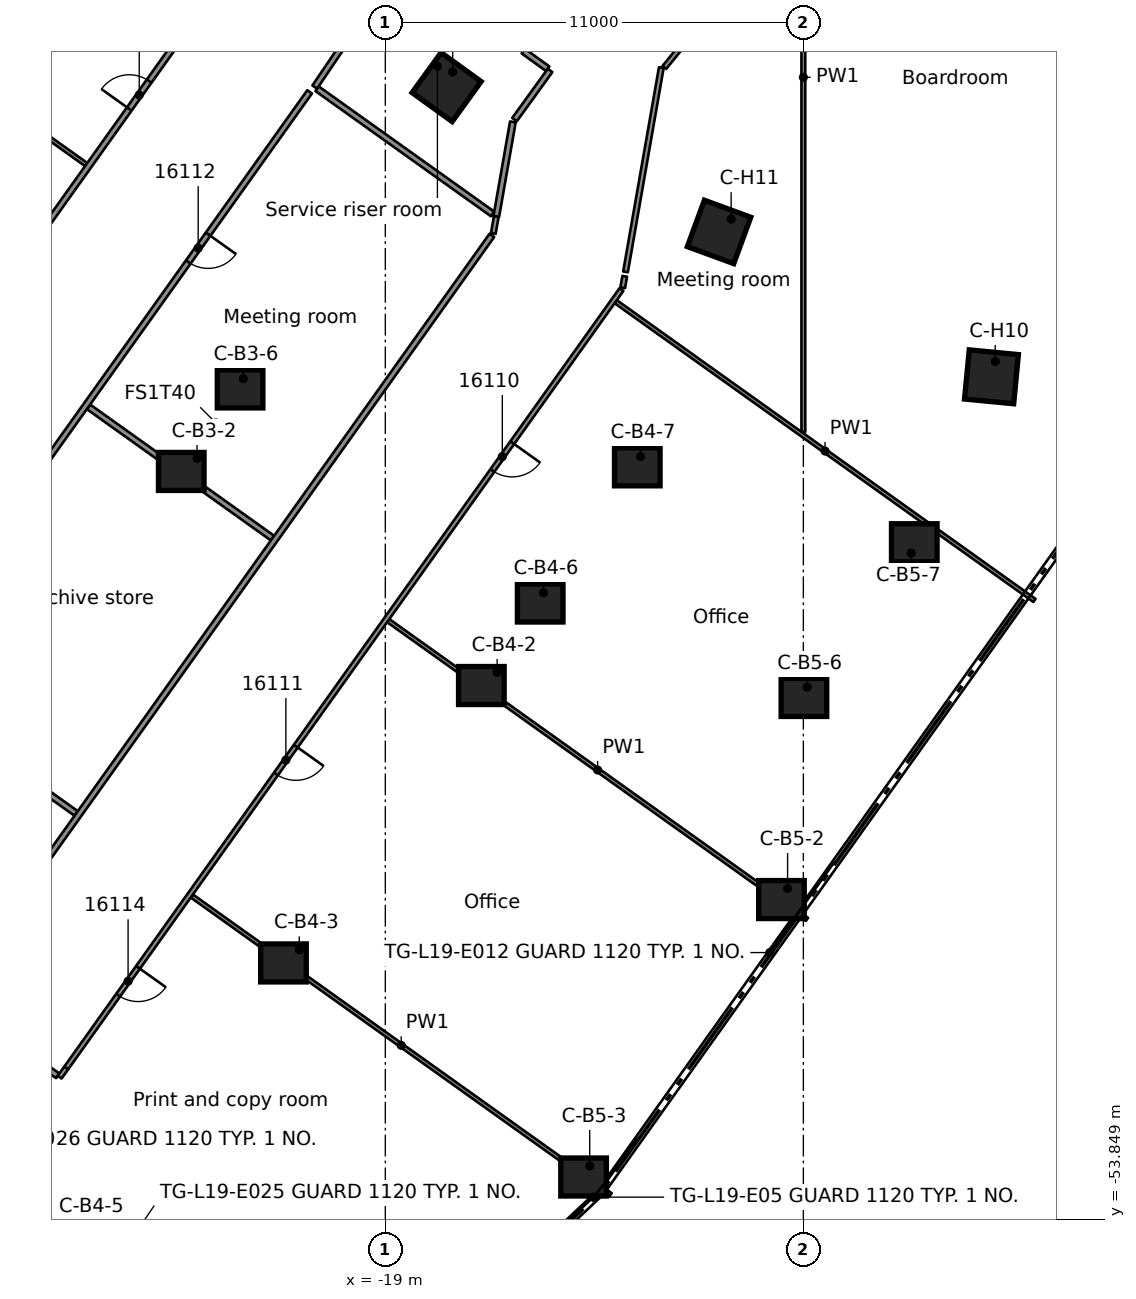
"""IFC4 building model, lengths in metres.
Left out: names, types, materials, properties, quantities, classifications, styles, units other than length and angle.
Written with IfcOpenShell. Run it as: python <this file> out.ifc"""

import sys

from ifc_helpers import new_model, si_unit, direction, frame, frame_2d, origin, origin_2d, place, context, subcontext, project, spatial, rectangle, extrude, element, fill, save


model = new_model("IFC4")
c1 = context("Model", 3, precision=1e-05, world=origin(), true_north=direction((0.0, 1.0)))
c2 = subcontext(c1, "Body", "Model", "MODEL_VIEW")
j1 = project(units=[si_unit("LENGTHUNIT", "METRE"), si_unit("PLANEANGLEUNIT", "RADIAN")], contexts=[c1])
p1 = place(None, origin())
s1 = spatial("IfcSite", under=j1, at=p1, CompositionType="ELEMENT")
p2 = place(p1, origin())
s2 = spatial("IfcBuilding", under=s1, at=p2, CompositionType="ELEMENT")
p3 = place(p2, frame((0.0, 0.0, 80.7)))
s3 = spatial("IfcBuildingStorey", under=s2, at=p3, CompositionType="ELEMENT", Elevation=80.7)
for number, where, z_axis, x_axis in (
    (1, (-24.37, -34.166, 0.0), (0.0, 0.0, 1.0), (1.0, 0.0, 0.0)),
    (2, (-22.822, -31.995, 0.0), (0.0, 0.0, 1.0), (1.0, 0.0, 0.0)),
    (3, (-16.473, -39.799, 0.0), (0.0, 0.0, 1.0), (1.0, 0.0, 0.0)),
    (4, (-21.68, -47.098, 0.0), (0.0, 0.0, 1.0), (1.0, 0.0, 0.0)),
    (5, (-14.925, -37.628, 0.0), (0.0, 0.0, 1.0), (1.0, 0.0, 0.0)),
    (6, (-12.37, -34.045, 0.0), (0.0, 0.0, 1.0), (1.0, 0.0, 0.0)),
    (7, (-8.576, -45.431, 0.0), (0.0, 0.0, 1.0), (1.0, 0.0, 0.0)),
    (8, (-13.783, -52.731, 0.0), (0.0, 0.0, 1.0), (1.0, 0.0, 0.0)),
    (9, (-7.985, -40.113, 0.0), (0.0, 0.0, 1.0), (1.0, 0.0, 0.0)),
    (10, (-5.081, -36.042, 0.0), (0.0, 0.0, 1.0), (1.0, 0.0, 0.0)),
):
    element("IfcColumn", number, at=place(p3, frame(where, z_axis=z_axis, x_axis=x_axis)), inside=s3, PredefinedType="COLUMN", context=c2, shape_type="SweptSolid", body=[
        extrude(rectangle(XDim=1.2, YDim=1.0, at=origin_2d()), origin(), (0.0, 0.0, 1.0), 3.5),
    ])
for number, where, z_axis, x_axis in (
    (11, (-3.05, -31.676, 0.0), (0.0, 0.0, 1.0), (-0.096, -0.995, 0.0)),
    (12, (-10.218, -27.864, 0.0), (0.0, 0.0, 1.0), (-0.344, -0.939, 0.0)),
    (13, (-17.387, -24.053, 0.0), (0.0, 0.0, 1.0), (-0.586, -0.81, 0.0)),
):
    element("IfcColumn", number, at=place(p3, frame(where, z_axis=z_axis, x_axis=x_axis)), inside=s3, PredefinedType="COLUMN", context=c2, shape_type="SweptSolid", body=[
        extrude(rectangle(XDim=1.3, YDim=1.3, at=origin_2d()), origin(), (0.0, 0.0, 1.0), 3.5),
    ])
p4 = place(p3, frame((-15.369, -23.107, 0.0), z_axis=(0.0, 0.0, 1.0), x_axis=(0.810768536176, -0.585366877049, 0.0)))
e14 = element("IfcWall", 14, at=p4, inside=s3, PredefinedType="PARTITIONING", context=c2, shape_type="SweptSolid", body=[
    extrude(rectangle(XDim=0.793, YDim=0.15, at=frame_2d((0.396, 0.0))), origin(), (0.0, 0.0, 1.0), 3.08),
])
p5 = place(p3, frame((-27.621, -50.068, 0.0), z_axis=(0.0, 0.0, 1.0), x_axis=(-0.814096747286, 0.580729270881, 0.0)))
e15 = element("IfcWall", 15, at=p5, inside=s3, PredefinedType="PARTITIONING", context=c2, shape_type="SweptSolid", body=[
    extrude(rectangle(XDim=13.163, YDim=0.15, at=frame_2d((6.582, 0.0))), origin(), (0.0, 0.0, 1.0), 3.08),
])
p6 = place(p5, frame((9.438, 0.0, 0.0)))
e16 = element("IfcOpeningElement", 16, at=p6, cuts=e15, PredefinedType="OPENING", context=c2, shape_type="SweptSolid", body=[
    extrude(rectangle(XDim=0.9, YDim=2.1, at=frame_2d((0.45, 1.05))), frame((0.0, 0.085, 0.0), z_axis=(0.0, -1.0, 0.0), x_axis=(1.0, 0.0, 0.0)), (0.0, 0.0, 1.0), 0.17),
])
p7 = place(p3, frame((-31.979, -39.712, 0.0), z_axis=(0.0, 0.0, 1.0), x_axis=(0.814224065699, -0.580550747857, 0.0)))
e17 = element("IfcWall", 17, at=p7, inside=s3, PredefinedType="PARTITIONING", context=c2, shape_type="SweptSolid", body=[
    extrude(rectangle(XDim=5.948, YDim=0.15, at=frame_2d((2.974, 0.0))), origin(), (0.0, 0.0, 1.0), 3.08),
])
p8 = place(p3, frame((-24.092, -45.337, 0.0), z_axis=(0.0, 0.0, 1.0), x_axis=(0.81412935301, -0.580683559753, 0.0)))
e18 = element("IfcWall", 18, at=p8, inside=s3, PredefinedType="PARTITIONING", context=c2, shape_type="SweptSolid", body=[
    extrude(rectangle(XDim=13.536, YDim=0.1, at=frame_2d((6.768, 0.0))), origin(), (0.0, 0.0, 1.0), 3.08),
])
p9 = place(p3, frame((-26.811, -32.466, 0.0), z_axis=(0.0, 0.0, 1.0), x_axis=(0.814165859022, -0.580632374229, 0.0)))
e19 = element("IfcWall", 19, at=p9, inside=s3, PredefinedType="PARTITIONING", context=c2, shape_type="SweptSolid", body=[
    extrude(rectangle(XDim=5.948, YDim=0.15, at=frame_2d((2.974, 0.0))), origin(), (0.0, 0.0, 1.0), 3.08),
])
p10 = place(p3, frame((-18.924, -38.091, 0.0), z_axis=(0.0, 0.0, 1.0), x_axis=(0.814103772743, -0.580719422101, 0.0)))
e20 = element("IfcWall", 20, at=p10, inside=s3, PredefinedType="PARTITIONING", context=c2, shape_type="SweptSolid", body=[
    extrude(rectangle(XDim=13.536, YDim=0.1, at=frame_2d((6.768, 0.0))), origin(), (0.0, 0.0, 1.0), 3.08),
])
p11 = place(p3, frame((-37.883, -18.239, 0.0), z_axis=(0.0, 0.0, 1.0), x_axis=(0.814185756817, -0.580604472423, 0.0)))
e21 = element("IfcWall", 21, at=p11, inside=s3, PredefinedType="PARTITIONING", context=c2, shape_type="SweptSolid", body=[
    extrude(rectangle(XDim=13.524, YDim=0.1, at=frame_2d((6.762, 0.0))), origin(), (0.0, 0.0, 1.0), 3.08),
])
p12 = place(p3, frame((-20.796, -24.096, 0.0), z_axis=(0.0, 0.0, 1.0), x_axis=(0.814114264503, -0.580704713544, 0.0)))
e22 = element("IfcWall", 22, at=p12, inside=s3, PredefinedType="PARTITIONING", context=c2, shape_type="SweptSolid", body=[
    extrude(rectangle(XDim=5.672, YDim=0.15, at=frame_2d((2.836, 0.0))), origin(), (0.0, 0.0, 1.0), 3.08),
])
p13 = place(p3, frame((-12.939, -29.699, 0.0), z_axis=(0.0, 0.0, 1.0), x_axis=(0.814095245994, -0.580731375465, 0.0)))
e23 = element("IfcWall", 23, at=p13, inside=s3, PredefinedType="PARTITIONING", context=c2, shape_type="SweptSolid", body=[
    extrude(rectangle(XDim=13.537, YDim=0.1, at=frame_2d((6.768, 0.0))), origin(), (0.0, 0.0, 1.0), 3.08),
])
p14 = place(p3, frame((-11.659, -23.538, 0.0), z_axis=(0.0, 0.0, 1.0), x_axis=(0.629190636354, 0.777251016805, 0.0)))
e24 = element("IfcWall", 24, at=p14, inside=s3, PredefinedType="PARTITIONING", context=c2, shape_type="SweptSolid", body=[
    extrude(rectangle(XDim=0.925, YDim=0.125, at=frame_2d((0.462, 0.0))), origin(), (0.0, 0.0, 1.0), 3.08),
])
p15 = place(p3, frame((-20.857, -24.052, 0.0), z_axis=(0.0, 0.0, 1.0), x_axis=(0.560544895906, 0.828124036406, 0.0)))
e25 = element("IfcWall", 25, at=p15, inside=s3, PredefinedType="PARTITIONING", context=c2, shape_type="SweptSolid", body=[
    extrude(rectangle(XDim=3.472, YDim=0.15, at=frame_2d((1.736, 0.0))), origin(), (0.0, 0.0, 1.0), 3.08),
])
p16 = place(p3, frame((-15.6, -24.908, 0.0), z_axis=(0.0, 0.0, 1.0), x_axis=(0.586004379832, 0.810307883966, 0.0)))
e26 = element("IfcWall", 26, at=p16, inside=s3, PredefinedType="PARTITIONING", context=c2, shape_type="SweptSolid", body=[
    extrude(rectangle(XDim=1.596, YDim=0.15, at=frame_2d((0.798, 0.0))), origin(), (0.0, 0.0, 1.0), 3.08),
])
p17 = place(p3, frame((-27.57, -50.104, 0.0), z_axis=(0.0, 0.0, 1.0), x_axis=(0.583082940186, 0.812412632142, 0.0)))
e27 = element("IfcWall", 27, at=p17, inside=s3, PredefinedType="PARTITIONING", context=c2, shape_type="SweptSolid", body=[
    extrude(rectangle(XDim=0.3, YDim=0.125, at=frame_2d((0.15, 0.0))), origin(), (0.0, 0.0, 1.0), 3.08),
])
p18 = place(p3, frame((-12.787, -29.381, 0.0), z_axis=(0.0, 0.0, 1.0), x_axis=(-0.580712931826, -0.81410840237, 0.0)))
e28 = element("IfcWall", 28, at=p18, inside=s3, PredefinedType="PARTITIONING", context=c2, shape_type="SweptSolid", body=[
    extrude(rectangle(XDim=25.155, YDim=0.125, at=frame_2d((12.578, 0.0))), origin(), (0.0, 0.0, 1.0), 3.08),
])
p19 = place(p18, frame((4.948, 0.0, 0.0)))
e29 = element("IfcOpeningElement", 29, at=p19, cuts=e28, PredefinedType="OPENING", context=c2, shape_type="SweptSolid", body=[
    extrude(rectangle(XDim=0.9, YDim=2.1, at=frame_2d((0.45, 1.05))), frame((0.0, 0.073, 0.0), z_axis=(0.0, -1.0, 0.0), x_axis=(1.0, 0.0, 0.0)), (0.0, 0.0, 1.0), 0.145),
])
p20 = place(p18, frame((14.755, 0.0, 0.0)))
e30 = element("IfcOpeningElement", 30, at=p20, cuts=e28, PredefinedType="OPENING", context=c2, shape_type="SweptSolid", body=[
    extrude(rectangle(XDim=0.9, YDim=2.1, at=frame_2d((0.45, 1.05))), frame((0.0, 0.073, 0.0), z_axis=(0.0, -1.0, 0.0), x_axis=(1.0, 0.0, 0.0)), (0.0, 0.0, 1.0), 0.145),
])
p21 = place(p18, frame((21.906, 0.0, 0.0)))
e31 = element("IfcOpeningElement", 31, at=p21, cuts=e28, PredefinedType="OPENING", context=c2, shape_type="SweptSolid", body=[
    extrude(rectangle(XDim=0.9, YDim=2.1, at=frame_2d((0.45, 1.05))), frame((0.0, 0.073, 0.0), z_axis=(0.0, -1.0, 0.0), x_axis=(1.0, 0.0, 0.0)), (0.0, 0.0, 1.0), 0.145),
])
p22 = place(p3, frame((-28.41, -45.081, 0.0), z_axis=(0.0, 0.0, 1.0), x_axis=(0.580610007884, 0.814181809392, 0.0)))
e32 = element("IfcWall", 32, at=p22, inside=s3, PredefinedType="PARTITIONING", context=c2, shape_type="SweptSolid", body=[
    extrude(rectangle(XDim=21.035, YDim=0.15, at=frame_2d((10.517, 0.0))), origin(), (0.0, 0.0, 1.0), 3.08),
])
p23 = place(p3, frame((-20.992, -24.178, 0.0), z_axis=(0.0, 0.0, 1.0), x_axis=(-0.580674845043, -0.814135568768, 0.0)))
e33 = element("IfcWall", 33, at=p23, inside=s3, PredefinedType="PARTITIONING", context=c2, shape_type="SweptSolid", body=[
    extrude(rectangle(XDim=19.026, YDim=0.15, at=frame_2d((9.513, 0.0))), origin(), (0.0, 0.0, 1.0), 3.08),
])
p24 = place(p23, frame((4.6, 0.0, 0.0)))
e34 = element("IfcOpeningElement", 34, at=p24, cuts=e33, PredefinedType="OPENING", context=c2, shape_type="SweptSolid", body=[
    extrude(rectangle(XDim=0.9, YDim=2.1, at=frame_2d((0.45, 1.05))), frame((0.0, 0.085, 0.0), z_axis=(0.0, -1.0, 0.0), x_axis=(1.0, 0.0, 0.0)), (0.0, 0.0, 1.0), 0.17),
])
p25 = place(p23, frame((14.226, 0.0, 0.0)))
e35 = element("IfcOpeningElement", 35, at=p25, cuts=e33, PredefinedType="OPENING", context=c2, shape_type="SweptSolid", body=[
    extrude(rectangle(XDim=0.9, YDim=2.1, at=frame_2d((0.45, 1.05))), frame((0.0, 0.085, 0.0), z_axis=(0.0, -1.0, 0.0), x_axis=(1.0, 0.0, 0.0)), (0.0, 0.0, 1.0), 0.17),
])
p26 = place(p3, frame((-37.621, -41.29, 0.0), z_axis=(0.0, 0.0, 1.0), x_axis=(0.580691447967, 0.814123726628, 0.0)))
e36 = element("IfcWall", 36, at=p26, inside=s3, PredefinedType="PARTITIONING", context=c2, shape_type="SweptSolid", body=[
    extrude(rectangle(XDim=23.111, YDim=0.15, at=frame_2d((11.555, 0.0))), origin(), (0.0, 0.0, 1.0), 3.08),
])
p27 = place(p26, frame((20.465, 0.0, 0.0)))
e37 = element("IfcOpeningElement", 37, at=p27, cuts=e36, PredefinedType="OPENING", context=c2, shape_type="SweptSolid", body=[
    extrude(rectangle(XDim=0.9, YDim=2.1, at=frame_2d((0.45, 1.05))), frame((0.0, 0.085, 0.0), z_axis=(0.0, -1.0, 0.0), x_axis=(1.0, 0.0, 0.0)), (0.0, 0.0, 1.0), 0.17),
])
p28 = place(p26, frame((15.561, 0.0, 0.0)))
e38 = element("IfcOpeningElement", 38, at=p28, cuts=e36, PredefinedType="OPENING", context=c2, shape_type="SweptSolid", body=[
    extrude(rectangle(XDim=0.9, YDim=2.1, at=frame_2d((0.45, 1.05))), frame((0.0, 0.085, 0.0), z_axis=(0.0, -1.0, 0.0), x_axis=(1.0, 0.0, 0.0)), (0.0, 0.0, 1.0), 0.17),
])
p29 = place(p26, frame((8.662, 0.0, 0.0)))
e39 = element("IfcOpeningElement", 39, at=p29, cuts=e36, PredefinedType="OPENING", context=c2, shape_type="SweptSolid", body=[
    extrude(rectangle(XDim=0.9, YDim=2.1, at=frame_2d((0.45, 1.05))), frame((0.0, 0.085, 0.0), z_axis=(0.0, -1.0, 0.0), x_axis=(1.0, 0.0, 0.0)), (0.0, 0.0, 1.0), 0.17),
])
p30 = place(p3, frame((-12.753, -29.331, 0.0), z_axis=(0.0, 0.0, 1.0), x_axis=(0.173876753839, 0.984767421513, 0.0)))
e40 = element("IfcWall", 40, at=p30, inside=s3, PredefinedType="PARTITIONING", context=c2, shape_type="SweptSolid", body=[
    extrude(rectangle(XDim=0.305, YDim=0.125, at=frame_2d((0.152, 0.0))), origin(), (0.0, 0.0, 1.0), 3.08),
])
p31 = place(p3, frame((-16.081, -27.459, 0.0), z_axis=(0.0, 0.0, 1.0), x_axis=(0.17293102002, 0.984933938046, 0.0)))
e41 = element("IfcWall", 41, at=p31, inside=s3, PredefinedType="PARTITIONING", context=c2, shape_type="SweptSolid", body=[
    extrude(rectangle(XDim=2.527, YDim=0.15, at=frame_2d((1.264, 0.0))), origin(), (0.0, 0.0, 1.0), 3.08),
])
p32 = place(p3, frame((-12.68, -28.915, 0.0), z_axis=(0.0, 0.0, 1.0), x_axis=(0.172666933714, 0.984980268839, 0.0)))
e42 = element("IfcWall", 42, at=p32, inside=s3, PredefinedType="PARTITIONING", context=c2, shape_type="SweptSolid", body=[
    extrude(rectangle(XDim=5.455, YDim=0.125, at=frame_2d((2.728, 0.0))), origin(), (0.0, 0.0, 1.0), 3.08),
])
p33 = place(p3, frame((-16.159, -27.905, 0.0), z_axis=(0.0, 0.0, 1.0), x_axis=(0.17200102348, 0.985096770841, 0.0)))
e43 = element("IfcWall", 43, at=p33, inside=s3, PredefinedType="PARTITIONING", context=c2, shape_type="SweptSolid", body=[
    extrude(rectangle(XDim=0.453, YDim=0.125, at=frame_2d((0.227, 0.0))), origin(), (0.0, 0.0, 1.0), 3.08),
])
p34 = place(p3, frame((-8.0, -33.126, 0.0), z_axis=(0.0, 0.0, 1.0), x_axis=(0.0, 1.0, 0.0)))
e44 = element("IfcWall", 44, at=p34, inside=s3, PredefinedType="PARTITIONING", context=c2, shape_type="SweptSolid", body=[
    extrude(rectangle(XDim=18.663, YDim=0.1, at=frame_2d((9.332, 0.0))), origin(), (0.0, 0.0, 1.0), 3.08),
])
p35 = place(p19, origin())
e45 = element("IfcDoor", 45, at=p35, inside=s3, OperationType="SINGLE_SWING_LEFT", PredefinedType="DOOR", context=c2, shape_type="SweptSolid", body=[
    extrude(rectangle(XDim=0.9, YDim=2.1, at=frame_2d((0.45, 1.05))), frame((0.0, 0.025, 0.0), z_axis=(0.0, -1.0, 0.0), x_axis=(1.0, 0.0, 0.0)), (0.0, 0.0, 1.0), 0.05),
])
fill(e29, e45)
p36 = place(p20, origin())
e46 = element("IfcDoor", 46, at=p36, inside=s3, OperationType="SINGLE_SWING_RIGHT", PredefinedType="DOOR", context=c2, shape_type="SweptSolid", body=[
    extrude(rectangle(XDim=0.9, YDim=2.1, at=frame_2d((0.45, 1.05))), frame((0.0, 0.025, 0.0), z_axis=(0.0, -1.0, 0.0), x_axis=(1.0, 0.0, 0.0)), (0.0, 0.0, 1.0), 0.05),
])
fill(e30, e46)
p37 = place(p24, origin())
e47 = element("IfcDoor", 47, at=p37, inside=s3, OperationType="SINGLE_SWING_LEFT", PredefinedType="DOOR", context=c2, shape_type="SweptSolid", body=[
    extrude(rectangle(XDim=0.9, YDim=2.1, at=frame_2d((0.45, 1.05))), frame((0.0, 0.025, 0.0), z_axis=(0.0, -1.0, 0.0), x_axis=(1.0, 0.0, 0.0)), (0.0, 0.0, 1.0), 0.05),
])
fill(e34, e47)
p38 = place(p21, origin())
e48 = element("IfcDoor", 48, at=p38, inside=s3, OperationType="SINGLE_SWING_RIGHT", PredefinedType="DOOR", context=c2, shape_type="SweptSolid", body=[
    extrude(rectangle(XDim=0.9, YDim=2.1, at=frame_2d((0.45, 1.05))), frame((0.0, 0.025, 0.0), z_axis=(0.0, -1.0, 0.0), x_axis=(1.0, 0.0, 0.0)), (0.0, 0.0, 1.0), 0.05),
])
fill(e31, e48)
p39 = place(p27, origin())
e49 = element("IfcDoor", 49, at=p39, inside=s3, OperationType="SINGLE_SWING_RIGHT", PredefinedType="DOOR", context=c2, shape_type="SweptSolid", body=[
    extrude(rectangle(XDim=0.9, YDim=2.1, at=frame_2d((0.45, 1.05))), frame((0.0, 0.025, 0.0), z_axis=(0.0, -1.0, 0.0), x_axis=(1.0, 0.0, 0.0)), (0.0, 0.0, 1.0), 0.05),
])
fill(e37, e49)
save(model, sys.argv[1])
